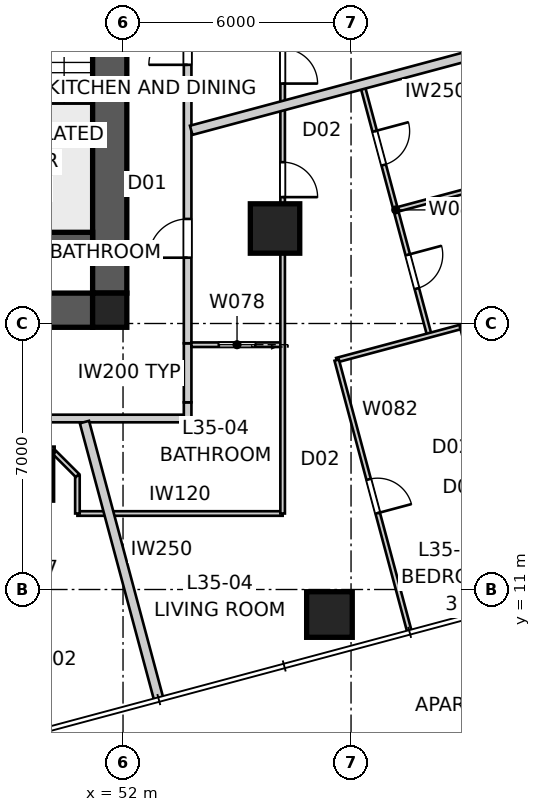
"""IFC4 building model, lengths in metres.
Left out: names, types, materials, properties, quantities, classifications, styles, units other than length and angle.
Written with IfcOpenShell. Run it as: python <this file> out.ifc"""

import sys

from ifc_helpers import new_model, si_unit, direction, frame, frame_2d, origin, origin_2d, place, context, subcontext, project, spatial, polyline, rectangle, outline, extrude, element, fill, save


model = new_model("IFC4")
c1 = context("Model", 3, precision=1e-05, world=origin(), true_north=direction((0.0, 1.0)))
c2 = subcontext(c1, "Body", "Model", "MODEL_VIEW")
j1 = project(units=[si_unit("LENGTHUNIT", "METRE"), si_unit("PLANEANGLEUNIT", "RADIAN")], contexts=[c1])
p1 = place(None, origin())
s1 = spatial("IfcSite", under=j1, at=p1, CompositionType="ELEMENT")
p2 = place(p1, origin())
s2 = spatial("IfcBuilding", under=s1, at=p2, CompositionType="ELEMENT")
p3 = place(p2, frame((0.0, 0.0, 128.6)))
s3 = spatial("IfcBuildingStorey", under=s2, at=p3, CompositionType="ELEMENT", Elevation=128.6)
p4 = place(p3, frame((51.2, 18.35, 0.0), z_axis=(0.0, 0.0, 1.0), x_axis=(-1.0, 0.0, 0.0)))
e1 = element("IfcWall", 1, at=p4, inside=s3, PredefinedType="SHEAR", context=c2, shape_type="SweptSolid", body=[
    extrude(outline(polyline([(0.0, -0.45), (22.4, -0.45), (22.4, -0.025), (22.85, -0.025), (22.85, 0.025), (22.4, 0.025), (22.4, 0.45), (0.0, 0.45), (0.0, 0.025), (-0.45, 0.025), (-0.45, -0.025), (0.0, -0.025), (0.0, -0.45)])), origin(), (0.0, 0.0, 1.0), 3.4),
])
p5 = place(p3, frame((51.65, 18.8, 0.0), z_axis=(0.0, 0.0, 1.0), x_axis=(0.0, 1.0, 0.0)))
e2 = element("IfcWall", 2, at=p5, inside=s3, PredefinedType="SHEAR", context=c2, shape_type="SweptSolid", body=[
    extrude(outline(polyline([(0.0, -0.45), (22.4, -0.45), (22.4, -0.025), (22.85, -0.025), (22.85, 0.025), (22.4, 0.025), (22.4, 0.45), (0.0, 0.45), (0.0, 0.025), (-0.45, 0.025), (-0.45, -0.025), (0.0, -0.025), (0.0, -0.45)])), origin(), (0.0, 0.0, 1.0), 3.4),
])
p6 = place(p5, frame((11.14, 0.0, 0.0)))
e3 = element("IfcOpeningElement", 3, at=p6, cuts=e2, PredefinedType="OPENING", context=c2, shape_type="SweptSolid", body=[
    extrude(rectangle(XDim=1.02, YDim=2.4, at=frame_2d((0.51, 1.2))), frame((0.0, 0.46, 0.0), z_axis=(0.0, -1.0, 0.0), x_axis=(1.0, 0.0, 0.0)), (0.0, 0.0, 1.0), 0.92),
])
p7 = place(p3, frame((51.2, 20.25, 0.0), z_axis=(0.0, 0.0, 1.0), x_axis=(-1.0, 0.0, 0.0)))
e4 = element("IfcWall", 4, at=p7, inside=s3, PredefinedType="SHEAR", context=c2, shape_type="SweptSolid", body=[
    extrude(rectangle(XDim=3.5, YDim=0.3, at=frame_2d((1.75, 0.0))), origin(), (0.0, 0.0, 1.0), 3.4),
])
p8 = place(p3, frame((51.65, 18.35, 0.0), z_axis=(0.0, 0.0, 1.0), x_axis=(1.0, 0.0, 0.0)))
e5 = element("IfcColumn", 5, at=p8, inside=s3, PredefinedType="COLUMN", context=c2, shape_type="SweptSolid", body=[
    extrude(rectangle(XDim=0.9, YDim=0.9, at=origin_2d()), origin(), (0.0, 0.0, 1.0), 3.4),
])
p9 = place(p3, frame((57.432, 10.342, 0.0), z_axis=(0.0, 0.0, 1.0), x_axis=(1.0, 0.0, 0.0)))
e6 = element("IfcColumn", 6, at=p9, inside=s3, PredefinedType="COLUMN", context=c2, shape_type="SweptSolid", body=[
    extrude(rectangle(XDim=1.2, YDim=1.2, at=origin_2d()), origin(), (0.0, 0.0, 1.0), 3.4),
])
for number, where, z_axis, x_axis in (
    (7, (49.5, 14.0, 0.0), (0.0, 0.0, 1.0), (1.0, 0.0, 0.0)),
    (8, (56.0, 20.5, 0.0), (0.0, 0.0, 1.0), (1.0, 0.0, 0.0)),
):
    element("IfcColumn", number, at=place(p3, frame(where, z_axis=z_axis, x_axis=x_axis)), inside=s3, PredefinedType="COLUMN", context=c2, shape_type="SweptSolid", body=[
        extrude(rectangle(XDim=1.3, YDim=1.3, at=origin_2d()), origin(), (0.0, 0.0, 1.0), 3.4),
    ])
p10 = place(p3, frame((25.5, 15.5, 0.0), z_axis=(0.0, 0.0, 1.0), x_axis=(1.0, 0.0, 0.0)))
e9 = element("IfcWall", 9, at=p10, inside=s3, PredefinedType="PARTITIONING", context=c2, shape_type="SweptSolid", body=[
    extrude(rectangle(XDim=28.2, YDim=0.2, at=frame_2d((14.1, 0.0))), origin(), (0.0, 0.0, 1.0), 3.25),
])
p11 = place(p10, frame((2.244, 0.0, 0.0)))
e10 = element("IfcOpeningElement", 10, at=p11, cuts=e9, PredefinedType="OPENING", context=c2, shape_type="SweptSolid", body=[
    extrude(rectangle(XDim=1.02, YDim=2.1, at=frame_2d((0.51, 1.05))), frame((0.0, 0.11, 0.0), z_axis=(0.0, -1.0, 0.0), x_axis=(1.0, 0.0, 0.0)), (0.0, 0.0, 1.0), 0.22),
])
p12 = place(p10, frame((9.542, 0.0, 0.0)))
e11 = element("IfcOpeningElement", 11, at=p12, cuts=e9, PredefinedType="OPENING", context=c2, shape_type="SweptSolid", body=[
    extrude(rectangle(XDim=1.02, YDim=2.34, at=frame_2d((0.51, 1.17))), frame((0.0, 0.11, 0.0), z_axis=(0.0, -1.0, 0.0), x_axis=(1.0, 0.0, 0.0)), (0.0, 0.0, 1.0), 0.22),
])
p13 = place(p10, frame((21.994, 0.0, 0.0)))
e12 = element("IfcOpeningElement", 12, at=p13, cuts=e9, PredefinedType="OPENING", context=c2, shape_type="SweptSolid", body=[
    extrude(rectangle(XDim=1.02, YDim=2.34, at=frame_2d((0.51, 1.17))), frame((0.0, 0.11, 0.0), z_axis=(0.0, -1.0, 0.0), x_axis=(1.0, 0.0, 0.0)), (0.0, 0.0, 1.0), 0.22),
])
p14 = place(p3, frame((53.7, 15.5, 0.0), z_axis=(0.0, 0.0, 1.0), x_axis=(0.0, 1.0, 0.0)))
e13 = element("IfcWall", 13, at=p14, inside=s3, PredefinedType="PARTITIONING", context=c2, shape_type="SweptSolid", body=[
    extrude(rectangle(XDim=0.426, YDim=0.2, at=frame_2d((0.213, 0.0))), origin(), (0.0, 0.0, 1.0), 3.25),
])
p15 = place(p3, frame((53.7, 15.926, 0.0), z_axis=(0.0, 0.0, 1.0), x_axis=(0.0, 1.0, 0.0)))
e14 = element("IfcWall", 14, at=p15, inside=s3, PredefinedType="PARTITIONING", context=c2, shape_type="SweptSolid", body=[
    extrude(rectangle(XDim=1.554, YDim=0.2, at=frame_2d((0.777, 0.0))), origin(), (0.0, 0.0, 1.0), 2.722),
])
p16 = place(p3, frame((53.7, 17.48, 0.0), z_axis=(0.0, 0.0, 1.0), x_axis=(0.0, 1.0, 0.0)))
e15 = element("IfcWall", 15, at=p16, inside=s3, PredefinedType="PARTITIONING", context=c2, shape_type="SweptSolid", body=[
    extrude(rectangle(XDim=26.22, YDim=0.2, at=frame_2d((13.11, 0.0))), origin(), (0.0, 0.0, 1.0), 3.25),
])
p17 = place(p16, frame((2.252, 0.0, 0.0)))
e16 = element("IfcOpeningElement", 16, at=p17, cuts=e15, PredefinedType="OPENING", context=c2, shape_type="SweptSolid", body=[
    extrude(rectangle(XDim=1.02, YDim=2.34, at=frame_2d((0.51, 1.17))), frame((0.0, 0.11, 0.0), z_axis=(0.0, -1.0, 0.0), x_axis=(1.0, 0.0, 0.0)), (0.0, 0.0, 1.0), 0.22),
])
p18 = place(p16, frame((7.328, 0.0, 0.0)))
e17 = element("IfcOpeningElement", 17, at=p18, cuts=e15, PredefinedType="OPENING", context=c2, shape_type="SweptSolid", body=[
    extrude(rectangle(XDim=1.02, YDim=2.34, at=frame_2d((0.51, 1.17))), frame((0.0, 0.11, 0.0), z_axis=(0.0, -1.0, 0.0), x_axis=(1.0, 0.0, 0.0)), (0.0, 0.0, 1.0), 0.22),
])
p19 = place(p3, frame((52.942, 8.104, 0.0), z_axis=(0.0, 0.0, 1.0), x_axis=(-0.258822171171, 0.965924988656, 0.0)))
e18 = element("IfcWall", 18, at=p19, inside=s3, PredefinedType="PARTITIONING", context=c2, shape_type="SweptSolid", body=[
    extrude(rectangle(XDim=7.56, YDim=0.25, at=frame_2d((3.78, 0.0))), origin(), (0.0, 0.0, 1.0), 3.25),
])
p20 = place(p3, frame((66.318, 26.44, 0.0), z_axis=(0.0, 0.0, 1.0), x_axis=(-0.965924854576, -0.258822671559, 0.0)))
e19 = element("IfcWall", 19, at=p20, inside=s3, PredefinedType="PARTITIONING", context=c2, shape_type="SweptSolid", body=[
    extrude(rectangle(XDim=12.966, YDim=0.25, at=frame_2d((6.483, 0.0))), origin(), (0.0, 0.0, 1.0), 3.25),
])
p21 = place(p3, frame((56.2, 13.0, 0.0), z_axis=(0.0, 0.0, 1.0), x_axis=(-1.0, 0.0, 0.0)))
e20 = element("IfcWall", 20, at=p21, inside=s3, PredefinedType="PARTITIONING", context=c2, shape_type="SweptSolid", body=[
    extrude(rectangle(XDim=5.4, YDim=0.12, at=frame_2d((2.7, 0.0))), origin(), (0.0, 0.0, 1.0), 3.25),
])
p22 = place(p3, frame((50.8, 13.0, 0.0), z_axis=(0.0, 0.0, 1.0), x_axis=(0.0, 1.0, 0.0)))
e21 = element("IfcWall", 21, at=p22, inside=s3, PredefinedType="PARTITIONING", context=c2, shape_type="SweptSolid", body=[
    extrude(rectangle(XDim=1.0, YDim=0.12, at=frame_2d((0.5, 0.0))), origin(), (0.0, 0.0, 1.0), 3.25),
])
p23 = place(p3, frame((50.8, 14.0, 0.0), z_axis=(0.0, 0.0, 1.0), x_axis=(-0.707106781187, 0.707106781187, 0.0)))
e22 = element("IfcWall", 22, at=p23, inside=s3, PredefinedType="PARTITIONING", context=c2, shape_type="SweptSolid", body=[
    extrude(rectangle(XDim=0.849, YDim=0.12, at=frame_2d((0.424, 0.0))), origin(), (0.0, 0.0, 1.0), 3.25),
])
p24 = place(p3, frame((50.2, 14.7, 0.0), z_axis=(0.0, 0.0, 1.0), x_axis=(-1.0, 0.0, 0.0)))
e23 = element("IfcWall", 23, at=p24, inside=s3, PredefinedType="PARTITIONING", context=c2, shape_type="SweptSolid", body=[
    extrude(rectangle(XDim=1.4, YDim=0.12, at=frame_2d((0.7, 0.0))), origin(), (0.0, 0.0, 1.0), 3.25),
])
p25 = place(p3, frame((56.2, 17.442, 0.0), z_axis=(0.0, 0.0, 1.0), x_axis=(-1.0, 0.0, 0.0)))
e24 = element("IfcWall", 24, at=p25, inside=s3, PredefinedType="PARTITIONING", context=c2, shape_type="SweptSolid", body=[
    extrude(rectangle(XDim=2.4, YDim=0.12, at=frame_2d((1.2, 0.0))), origin(), (0.0, 0.0, 1.0), 3.25),
])
p26 = place(p25, frame((0.72, 0.0, 0.0)))
e25 = element("IfcOpeningElement", 25, at=p26, cuts=e24, PredefinedType="OPENING", context=c2, shape_type="SweptSolid", body=[
    extrude(rectangle(XDim=0.96, YDim=2.1, at=frame_2d((0.48, 1.05))), frame((0.0, 0.07, 0.0), z_axis=(0.0, -1.0, 0.0), x_axis=(1.0, 0.0, 0.0)), (0.0, 0.0, 1.0), 0.14),
])
p27 = place(p3, frame((56.2, 46.2, 0.0), z_axis=(0.0, 0.0, 1.0), x_axis=(0.0, -1.0, 0.0)))
e26 = element("IfcWall", 26, at=p27, inside=s3, PredefinedType="PARTITIONING", context=c2, shape_type="SweptSolid", body=[
    extrude(rectangle(XDim=33.2, YDim=0.12, at=frame_2d((16.6, 0.0))), origin(), (0.0, 0.0, 1.0), 2.55),
])
p28 = place(p27, frame((23.955, 0.0, 0.0)))
e27 = element("IfcOpeningElement", 27, at=p28, cuts=e26, PredefinedType="OPENING", context=c2, shape_type="SweptSolid", body=[
    extrude(rectangle(XDim=0.92, YDim=2.34, at=frame_2d((0.46, 1.17))), frame((0.0, 0.07, 0.0), z_axis=(0.0, -1.0, 0.0), x_axis=(1.0, 0.0, 0.0)), (0.0, 0.0, 1.0), 0.14),
])
p29 = place(p27, frame((20.966, 0.0, 0.0)))
e28 = element("IfcOpeningElement", 28, at=p29, cuts=e26, PredefinedType="OPENING", context=c2, shape_type="SweptSolid", body=[
    extrude(rectangle(XDim=0.92, YDim=2.34, at=frame_2d((0.46, 1.17))), frame((0.0, 0.07, 0.0), z_axis=(0.0, -1.0, 0.0), x_axis=(1.0, 0.0, 0.0)), (0.0, 0.0, 1.0), 0.14),
])
p30 = place(p27, frame((13.174, 0.0, 0.0)))
e29 = element("IfcOpeningElement", 29, at=p30, cuts=e26, PredefinedType="OPENING", context=c2, shape_type="SweptSolid", body=[
    extrude(rectangle(XDim=0.96, YDim=2.1, at=frame_2d((0.48, 1.05))), frame((0.0, 0.07, 0.0), z_axis=(0.0, -1.0, 0.0), x_axis=(1.0, 0.0, 0.0)), (0.0, 0.0, 1.0), 0.14),
])
p31 = place(p3, frame((58.292, 24.29, 0.0), z_axis=(0.0, 0.0, 1.0), x_axis=(0.258809899302, -0.965928276853, 0.0)))
e30 = element("IfcWall", 30, at=p31, inside=s3, PredefinedType="PARTITIONING", context=c2, shape_type="SweptSolid", body=[
    extrude(rectangle(XDim=6.833, YDim=0.12, at=frame_2d((3.417, 0.0))), origin(), (0.0, 0.0, 1.0), 3.25),
])
p32 = place(p31, frame((1.273, 0.0, 0.0)))
e31 = element("IfcOpeningElement", 31, at=p32, cuts=e30, PredefinedType="OPENING", context=c2, shape_type="SweptSolid", body=[
    extrude(rectangle(XDim=0.92, YDim=2.34, at=frame_2d((0.46, 1.17))), frame((0.0, 0.07, 0.0), z_axis=(0.0, -1.0, 0.0), x_axis=(1.0, 0.0, 0.0)), (0.0, 0.0, 1.0), 0.14),
])
p33 = place(p31, frame((4.64, 0.0, 0.0)))
e32 = element("IfcOpeningElement", 32, at=p33, cuts=e30, PredefinedType="OPENING", context=c2, shape_type="SweptSolid", body=[
    extrude(rectangle(XDim=0.92, YDim=2.34, at=frame_2d((0.46, 1.17))), frame((0.0, 0.07, 0.0), z_axis=(0.0, -1.0, 0.0), x_axis=(1.0, 0.0, 0.0)), (0.0, 0.0, 1.0), 0.14),
])
p34 = place(p3, frame((68.048, 19.83, 0.0), z_axis=(0.0, 0.0, 1.0), x_axis=(-0.965921496576, -0.258835203272, 0.0)))
e33 = element("IfcWall", 33, at=p34, inside=s3, PredefinedType="PARTITIONING", context=c2, shape_type="SweptSolid", body=[
    extrude(rectangle(XDim=10.793, YDim=0.12, at=frame_2d((5.397, 0.0))), origin(), (0.0, 0.0, 1.0), 3.25),
])
p35 = place(p3, frame((57.623, 17.036, 0.0), z_axis=(0.0, 0.0, 1.0), x_axis=(0.258816044185, -0.965926630377, 0.0)))
e34 = element("IfcWall", 34, at=p35, inside=s3, PredefinedType="PARTITIONING", context=c2, shape_type="SweptSolid", body=[
    extrude(rectangle(XDim=7.377, YDim=0.12, at=frame_2d((3.688, 0.0))), origin(), (0.0, 0.0, 1.0), 2.638),
])
p36 = place(p35, frame((3.248, 0.0, 0.0)))
e35 = element("IfcOpeningElement", 35, at=p36, cuts=e34, PredefinedType="OPENING", context=c2, shape_type="SweptSolid", body=[
    extrude(rectangle(XDim=0.92, YDim=2.34, at=frame_2d((0.46, 1.17))), frame((0.0, 0.07, 0.0), z_axis=(0.0, -1.0, 0.0), x_axis=(1.0, 0.0, 0.0)), (0.0, 0.0, 1.0), 0.14),
])
p37 = place(p3, frame((67.164, 23.13, 0.0), z_axis=(0.0, 0.0, 1.0), x_axis=(-0.965929470378, -0.258805444794, 0.0)))
e36 = element("IfcWall", 36, at=p37, inside=s3, PredefinedType="PARTITIONING", context=c2, shape_type="SweptSolid", body=[
    extrude(rectangle(XDim=8.269, YDim=0.12, at=frame_2d((4.135, 0.0))), origin(), (0.0, 0.0, 1.0), 2.722),
])
p38 = place(p3, frame((60.923, 17.92, 0.0), z_axis=(0.0, 0.0, 1.0), x_axis=(0.258846923464, -0.965918355874, 0.0)))
e37 = element("IfcWall", 37, at=p38, inside=s3, PredefinedType="PARTITIONING", context=c2, shape_type="SweptSolid", body=[
    extrude(rectangle(XDim=7.377, YDim=0.12, at=frame_2d((3.688, 0.0))), origin(), (0.0, 0.0, 1.0), 3.25),
])
p39 = place(p38, frame((4.932, 0.0, 0.0)))
e38 = element("IfcOpeningElement", 38, at=p39, cuts=e37, PredefinedType="OPENING", context=c2, shape_type="SweptSolid", body=[
    extrude(rectangle(XDim=0.92, YDim=2.34, at=frame_2d((0.46, 1.17))), frame((0.0, 0.07, 0.0), z_axis=(0.0, -1.0, 0.0), x_axis=(1.0, 0.0, 0.0)), (0.0, 0.0, 1.0), 0.14),
])
p40 = place(p38, frame((1.273, 0.0, 0.0)))
e39 = element("IfcOpeningElement", 39, at=p40, cuts=e37, PredefinedType="OPENING", context=c2, shape_type="SweptSolid", body=[
    extrude(rectangle(XDim=0.92, YDim=2.34, at=frame_2d((0.46, 1.17))), frame((0.0, 0.07, 0.0), z_axis=(0.0, -1.0, 0.0), x_axis=(1.0, 0.0, 0.0)), (0.0, 0.0, 1.0), 0.14),
])
p41 = place(p17, origin())
e40 = element("IfcDoor", 40, at=p41, inside=s3, OperationType="SINGLE_SWING_LEFT", PredefinedType="DOOR", context=c2, shape_type="SweptSolid", body=[
    extrude(rectangle(XDim=1.02, YDim=2.34, at=frame_2d((0.51, 1.17))), frame((0.0, 0.025, 0.0), z_axis=(0.0, -1.0, 0.0), x_axis=(1.0, 0.0, 0.0)), (0.0, 0.0, 1.0), 0.05),
])
fill(e16, e40)
p42 = place(p18, origin())
e41 = element("IfcDoor", 41, at=p42, inside=s3, OperationType="SINGLE_SWING_LEFT", PredefinedType="DOOR", context=c2, shape_type="SweptSolid", body=[
    extrude(rectangle(XDim=1.02, YDim=2.34, at=frame_2d((0.51, 1.17))), frame((0.0, 0.025, 0.0), z_axis=(0.0, -1.0, 0.0), x_axis=(1.0, 0.0, 0.0)), (0.0, 0.0, 1.0), 0.05),
])
fill(e17, e41)
p43 = place(p28, origin())
e42 = element("IfcDoor", 42, at=p43, inside=s3, OperationType="SINGLE_SWING_RIGHT", PredefinedType="DOOR", context=c2, shape_type="SweptSolid", body=[
    extrude(rectangle(XDim=0.92, YDim=2.34, at=frame_2d((0.46, 1.17))), frame((0.0, 0.025, 0.0), z_axis=(0.0, -1.0, 0.0), x_axis=(1.0, 0.0, 0.0)), (0.0, 0.0, 1.0), 0.05),
])
fill(e27, e42)
p44 = place(p26, origin())
e43 = element("IfcDoor", 43, at=p44, inside=s3, OperationType="SLIDING_TO_LEFT", PredefinedType="DOOR", context=c2, shape_type="SweptSolid", body=[
    extrude(rectangle(XDim=0.96, YDim=2.1, at=frame_2d((0.48, 1.05))), frame((0.0, 0.025, 0.0), z_axis=(0.0, -1.0, 0.0), x_axis=(1.0, 0.0, 0.0)), (0.0, 0.0, 1.0), 0.05),
])
fill(e25, e43)
p45 = place(p29, origin())
e44 = element("IfcDoor", 44, at=p45, inside=s3, OperationType="SINGLE_SWING_RIGHT", PredefinedType="DOOR", context=c2, shape_type="SweptSolid", body=[
    extrude(rectangle(XDim=0.92, YDim=2.34, at=frame_2d((0.46, 1.17))), frame((0.0, 0.025, 0.0), z_axis=(0.0, -1.0, 0.0), x_axis=(1.0, 0.0, 0.0)), (0.0, 0.0, 1.0), 0.05),
])
fill(e28, e44)
p46 = place(p36, origin())
e45 = element("IfcDoor", 45, at=p46, inside=s3, OperationType="SINGLE_SWING_RIGHT", PredefinedType="DOOR", context=c2, shape_type="SweptSolid", body=[
    extrude(rectangle(XDim=0.92, YDim=2.34, at=frame_2d((0.46, 1.17))), frame((0.0, 0.025, 0.0), z_axis=(0.0, -1.0, 0.0), x_axis=(1.0, 0.0, 0.0)), (0.0, 0.0, 1.0), 0.05),
])
fill(e35, e45)
p47 = place(p32, origin())
e46 = element("IfcDoor", 46, at=p47, inside=s3, OperationType="SINGLE_SWING_LEFT", PredefinedType="DOOR", context=c2, shape_type="SweptSolid", body=[
    extrude(rectangle(XDim=0.92, YDim=2.34, at=frame_2d((0.46, 1.17))), frame((0.0, 0.025, 0.0), z_axis=(0.0, -1.0, 0.0), x_axis=(1.0, 0.0, 0.0)), (0.0, 0.0, 1.0), 0.05),
])
fill(e31, e46)
p48 = place(p33, origin())
e47 = element("IfcDoor", 47, at=p48, inside=s3, OperationType="SINGLE_SWING_LEFT", PredefinedType="DOOR", context=c2, shape_type="SweptSolid", body=[
    extrude(rectangle(XDim=0.92, YDim=2.34, at=frame_2d((0.46, 1.17))), frame((0.0, 0.025, 0.0), z_axis=(0.0, -1.0, 0.0), x_axis=(1.0, 0.0, 0.0)), (0.0, 0.0, 1.0), 0.05),
])
fill(e32, e47)
save(model, sys.argv[1])
